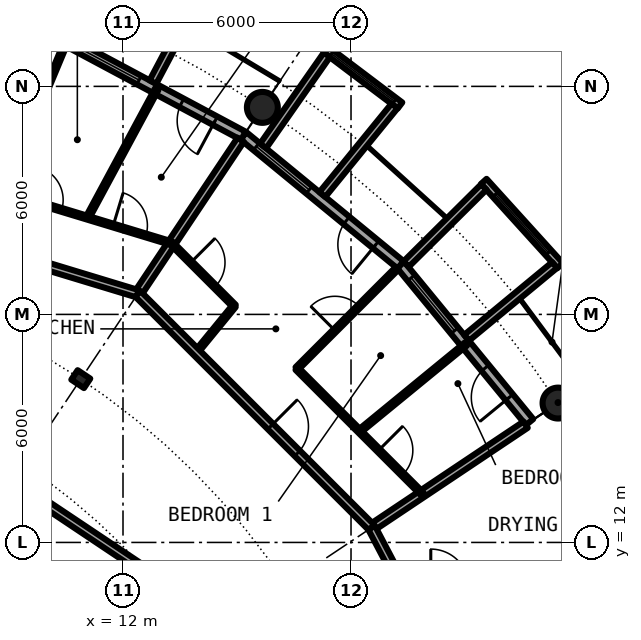
"""IFC4 building model, lengths in metres.
Left out: names, types, materials, properties, quantities, classifications, styles, units other than length and angle.
Written with IfcOpenShell. Run it as: python <this file> out.ifc"""

import sys

from ifc_helpers import new_model, si_unit, direction, frame, frame_2d, origin, origin_2d, place, context, subcontext, project, spatial, rectangle, circle, hollow_circle, i_section, extrude, element, fill, save


model = new_model("IFC4")
c1 = context("Model", 3, precision=1e-05, world=origin(), true_north=direction((0.0, 1.0)))
c2 = subcontext(c1, "Body", "Model", "MODEL_VIEW")
j1 = project(units=[si_unit("LENGTHUNIT", "METRE"), si_unit("PLANEANGLEUNIT", "RADIAN")], contexts=[c1])
p1 = place(None, origin())
s1 = spatial("IfcSite", under=j1, at=p1, CompositionType="ELEMENT")
p2 = place(p1, origin())
s2 = spatial("IfcBuilding", under=s1, at=p2, CompositionType="ELEMENT")
p3 = place(p2, frame((0.0, 0.0, 218.8)))
s3 = spatial("IfcBuildingStorey", under=s2, at=p3, CompositionType="ELEMENT", Elevation=218.8)
for number, where, z_axis, x_axis in (
    (1, (23.448, 15.667, 0.0), (0.0, 0.0, 1.0), (1.0, 0.0, 0.0)),
    (2, (15.667, 23.448, 0.0), (0.0, 0.0, 1.0), (1.0, 0.0, 0.0)),
):
    element("IfcColumn", number, at=place(p3, frame(where, z_axis=z_axis, x_axis=x_axis)), inside=s3, PredefinedType="COLUMN", context=c2, shape_type="SweptSolid", body=[
        extrude(hollow_circle(Radius=0.406, WallThickness=0.03, at=origin_2d()), origin(), (0.0, 0.0, 1.0), 3.05),
    ])
p4 = place(p3, frame((10.889, 16.297, 0.0), z_axis=(0.0, 0.0, 1.0), x_axis=(0.55557023302, 0.831469612303, 0.0)))
e3 = element("IfcColumn", 3, at=p4, inside=s3, PredefinedType="COLUMN", context=c2, shape_type="SweptSolid", body=[
    extrude(i_section(OverallWidth=0.3, OverallDepth=0.4, WebThickness=0.013, FlangeThickness=0.024, FilletRadius=0.027, at=origin_2d()), origin(), (0.0, 0.0, 1.0), 3.05),
])
p5 = place(p3, frame((22.699, 15.167, 0.0), z_axis=(0.0, 0.0, 1.0), x_axis=(-0.634382322723, 0.773019449054, 0.0)))
e4 = element("IfcWall", 4, at=p5, inside=s3, PredefinedType="SOLIDWALL", context=c2, shape_type="SweptSolid", body=[
    extrude(rectangle(XDim=5.352, YDim=0.25, at=frame_2d((2.676, 0.0))), origin(), (0.0, 0.0, 1.0), 2.65),
])
p6 = place(p5, frame((0.841, 0.0, 0.0)))
e5 = element("IfcOpeningElement", 5, at=p6, cuts=e4, PredefinedType="OPENING", context=c2, shape_type="SweptSolid", body=[
    extrude(rectangle(XDim=1.0, YDim=2.2, at=frame_2d((0.5, 1.1))), frame((0.0, 0.135, 0.0), z_axis=(0.0, -1.0, 0.0), x_axis=(1.0, 0.0, 0.0)), (0.0, 0.0, 1.0), 0.27),
])
p7 = place(p5, frame((3.111, 0.0, 0.3)))
e6 = element("IfcOpeningElement", 6, at=p7, cuts=e4, PredefinedType="OPENING", context=c2, shape_type="SweptSolid", body=[
    extrude(rectangle(XDim=1.8, YDim=2.1, at=frame_2d((0.9, 1.05))), frame((0.0, 0.135, 0.0), z_axis=(0.0, -1.0, 0.0), x_axis=(1.0, 0.0, 0.0)), (0.0, 0.0, 1.0), 0.27),
])
p8 = place(p3, frame((23.503, 19.282, -0.03), z_axis=(0.0, 0.0, 1.0), x_axis=(-0.671506829416, 0.740998365753, 0.0)))
e7 = element("IfcWall", 7, at=p8, inside=s3, PredefinedType="SOLIDWALL", context=c2, shape_type="SweptSolid", body=[
    extrude(rectangle(XDim=2.993, YDim=0.2, at=frame_2d((1.497, 0.0))), origin(), (0.0, 0.0, 1.0), 2.68),
])
p9 = place(p8, frame((0.457, 0.0, 0.33)))
e8 = element("IfcOpeningElement", 8, at=p9, cuts=e7, PredefinedType="OPENING", context=c2, shape_type="SweptSolid", body=[
    extrude(circle(Radius=1.04, at=frame_2d((1.04, 1.04))), frame((0.0, 0.11, 0.0), z_axis=(0.0, -1.0, 0.0), x_axis=(1.0, 0.0, 0.0)), (0.0, 0.0, 1.0), 0.22),
])
p10 = place(p3, frame((21.041, 17.384, -0.03), z_axis=(0.0, 0.0, 1.0), x_axis=(0.770784861449, 0.63709551667, 0.0)))
e9 = element("IfcWall", 9, at=p10, inside=s3, PredefinedType="SOLIDWALL", context=c2, shape_type="SweptSolid", body=[
    extrude(rectangle(XDim=3.006, YDim=0.2, at=frame_2d((1.503, 0.0))), origin(), (0.0, 0.0, 1.0), 2.68),
])
p11 = place(p3, frame((19.45, 19.323, -0.03), z_axis=(0.0, 0.0, 1.0), x_axis=(0.709727076896, 0.704476739375, 0.0)))
e10 = element("IfcWall", 10, at=p11, inside=s3, PredefinedType="SOLIDWALL", context=c2, shape_type="SweptSolid", body=[
    extrude(rectangle(XDim=2.883, YDim=0.2, at=frame_2d((1.441, 0.0))), origin(), (0.0, 0.0, 1.0), 2.68),
])
p12 = place(p3, frame((19.304, 19.304, 0.0), z_axis=(0.0, 0.0, 1.0), x_axis=(-0.773019449054, 0.634382322723, 0.0)))
e11 = element("IfcWall", 11, at=p12, inside=s3, PredefinedType="SOLIDWALL", context=c2, shape_type="SweptSolid", body=[
    extrude(rectangle(XDim=5.352, YDim=0.25, at=frame_2d((2.676, 0.0))), origin(), (0.0, 0.0, 1.0), 2.65),
])
p13 = place(p12, frame((0.841, 0.0, 0.0)))
e12 = element("IfcOpeningElement", 12, at=p13, cuts=e11, PredefinedType="OPENING", context=c2, shape_type="SweptSolid", body=[
    extrude(rectangle(XDim=1.0, YDim=2.2, at=frame_2d((0.5, 1.1))), frame((0.0, 0.135, 0.0), z_axis=(0.0, -1.0, 0.0), x_axis=(1.0, 0.0, 0.0)), (0.0, 0.0, 1.0), 0.27),
])
p14 = place(p12, frame((3.111, 0.0, 0.3)))
e13 = element("IfcOpeningElement", 13, at=p14, cuts=e11, PredefinedType="OPENING", context=c2, shape_type="SweptSolid", body=[
    extrude(rectangle(XDim=1.8, YDim=2.1, at=frame_2d((0.9, 1.05))), frame((0.0, 0.135, 0.0), z_axis=(0.0, -1.0, 0.0), x_axis=(1.0, 0.0, 0.0)), (0.0, 0.0, 1.0), 0.27),
])
p15 = place(p3, frame((19.289, 23.497, -0.03), z_axis=(0.0, 0.0, 1.0), x_axis=(-0.797887588059, 0.602806268067, 0.0)))
e14 = element("IfcWall", 14, at=p15, inside=s3, PredefinedType="SOLIDWALL", context=c2, shape_type="SweptSolid", body=[
    extrude(rectangle(XDim=2.447, YDim=0.2, at=frame_2d((1.223, 0.0))), origin(), (0.0, 0.0, 1.0), 2.68),
])
p16 = place(p15, frame((0.183, 0.0, 0.33)))
e15 = element("IfcOpeningElement", 15, at=p16, cuts=e14, PredefinedType="OPENING", context=c2, shape_type="SweptSolid", body=[
    extrude(circle(Radius=1.04, at=frame_2d((1.04, 1.04))), frame((0.0, 0.11, 0.0), z_axis=(0.0, -1.0, 0.0), x_axis=(1.0, 0.0, 0.0)), (0.0, 0.0, 1.0), 0.22),
])
p17 = place(p3, frame((17.246, 21.155, -0.03), z_axis=(0.0, 0.0, 1.0), x_axis=(0.631741648902, 0.775179004516, 0.0)))
e16 = element("IfcWall", 16, at=p17, inside=s3, PredefinedType="SOLIDWALL", context=c2, shape_type="SweptSolid", body=[
    extrude(rectangle(XDim=3.006, YDim=0.2, at=frame_2d((1.503, 0.0))), origin(), (0.0, 0.0, 1.0), 2.68),
])
p18 = place(p3, frame((15.688, 22.433, -0.03), z_axis=(0.0, 0.0, 1.0), x_axis=(0.573260687834, 0.819373043115, 0.0)))
e17 = element("IfcWall", 17, at=p18, inside=s3, PredefinedType="SOLIDWALL", context=c2, shape_type="SweptSolid", body=[
    extrude(rectangle(XDim=2.925, YDim=0.2, at=frame_2d((1.463, 0.0))), origin(), (0.0, 0.0, 1.0), 2.68),
])
p19 = place(p3, frame((15.167, 22.699, 0.0), z_axis=(0.0, 0.0, 1.0), x_axis=(-0.881915646801, 0.471407246368, 0.0)))
e18 = element("IfcWall", 18, at=p19, inside=s3, PredefinedType="SOLIDWALL", context=c2, shape_type="SweptSolid", body=[
    extrude(rectangle(XDim=5.352, YDim=0.25, at=frame_2d((2.676, 0.0))), origin(), (0.0, 0.0, 1.0), 2.65),
])
p20 = place(p19, frame((0.841, 0.0, 0.0)))
e19 = element("IfcOpeningElement", 19, at=p20, cuts=e18, PredefinedType="OPENING", context=c2, shape_type="SweptSolid", body=[
    extrude(rectangle(XDim=1.0, YDim=2.2, at=frame_2d((0.5, 1.1))), frame((0.0, 0.135, 0.0), z_axis=(0.0, -1.0, 0.0), x_axis=(1.0, 0.0, 0.0)), (0.0, 0.0, 1.0), 0.27),
])
p21 = place(p19, frame((3.111, 0.0, 0.3)))
e20 = element("IfcOpeningElement", 20, at=p21, cuts=e18, PredefinedType="OPENING", context=c2, shape_type="SweptSolid", body=[
    extrude(rectangle(XDim=1.8, YDim=2.1, at=frame_2d((0.9, 1.05))), frame((0.0, 0.135, 0.0), z_axis=(0.0, -1.0, 0.0), x_axis=(1.0, 0.0, 0.0)), (0.0, 0.0, 1.0), 0.27),
])
p22 = place(p3, frame((12.787, 24.113, -0.03), z_axis=(0.0, 0.0, 1.0), x_axis=(0.468365282436, 0.883534924159, 0.0)))
e21 = element("IfcWall", 21, at=p22, inside=s3, PredefinedType="SOLIDWALL", context=c2, shape_type="SweptSolid", body=[
    extrude(rectangle(XDim=3.006, YDim=0.2, at=frame_2d((1.503, 0.0))), origin(), (0.0, 0.0, 1.0), 2.68),
])
p23 = place(p3, frame((8.852, 21.215, 0.0), z_axis=(0.0, 0.0, 1.0), x_axis=(0.385232176411, 0.922819684585, 0.0)))
e22 = element("IfcWall", 22, at=p23, inside=s3, PredefinedType="PARTITIONING", context=c2, shape_type="SweptSolid", body=[
    extrude(rectangle(XDim=4.187, YDim=0.1, at=frame_2d((2.094, 0.0))), origin(), (0.0, 0.0, 1.0), 2.65),
])
p24 = place(p3, frame((11.065, 20.543, 0.0), z_axis=(0.0, 0.0, 1.0), x_axis=(0.474281720599, 0.88037313084, 0.0)))
e23 = element("IfcWall", 23, at=p24, inside=s3, PredefinedType="PARTITIONING", context=c2, shape_type="SweptSolid", body=[
    extrude(rectangle(XDim=3.842, YDim=0.1, at=frame_2d((1.921, 0.0))), origin(), (0.0, 0.0, 1.0), 2.65),
])
p25 = place(p3, frame((12.389, 18.542, 0.0), z_axis=(0.0, 0.0, 1.0), x_axis=(0.555462686211, 0.831541462723, 0.0)))
e24 = element("IfcWall", 24, at=p25, inside=s3, PredefinedType="PARTITIONING", context=c2, shape_type="SweptSolid", body=[
    extrude(rectangle(XDim=4.875, YDim=0.2, at=frame_2d((2.438, 0.0))), origin(), (0.0, 0.0, 1.0), 2.65),
])
p26 = place(p3, frame((16.575, 16.575, 0.0), z_axis=(0.0, 0.0, 1.0), x_axis=(0.707106781187, 0.707106781187, 0.0)))
e25 = element("IfcWall", 25, at=p26, inside=s3, PredefinedType="PARTITIONING", context=c2, shape_type="SweptSolid", body=[
    extrude(rectangle(XDim=3.735, YDim=0.1, at=frame_2d((1.868, 0.0))), origin(), (0.0, 0.0, 1.0), 2.65),
])
p27 = place(p26, frame((1.417, 0.0, 0.0)))
e26 = element("IfcOpeningElement", 26, at=p27, cuts=e25, PredefinedType="OPENING", context=c2, shape_type="SweptSolid", body=[
    extrude(rectangle(XDim=0.9, YDim=2.3, at=frame_2d((0.45, 1.15))), frame((0.0, 0.06, 0.0), z_axis=(0.0, -1.0, 0.0), x_axis=(1.0, 0.0, 0.0)), (0.0, 0.0, 1.0), 0.12),
])
p28 = place(p3, frame((18.224, 14.927, 0.0), z_axis=(0.0, 0.0, 1.0), x_axis=(0.773548271597, 0.633737383709, 0.0)))
e27 = element("IfcWall", 27, at=p28, inside=s3, PredefinedType="PARTITIONING", context=c2, shape_type="SweptSolid", body=[
    extrude(rectangle(XDim=3.618, YDim=0.1, at=frame_2d((1.809, 0.0))), origin(), (0.0, 0.0, 1.0), 2.65),
])
p29 = place(p3, frame((18.542, 12.389, 0.0), z_axis=(0.0, 0.0, 1.0), x_axis=(0.831387096605, 0.55569370664, 0.0)))
e28 = element("IfcWall", 28, at=p29, inside=s3, PredefinedType="PARTITIONING", context=c2, shape_type="SweptSolid", body=[
    extrude(rectangle(XDim=4.875, YDim=0.2, at=frame_2d((2.438, 0.0))), origin(), (0.0, 0.0, 1.0), 2.65),
])
p30 = place(p3, frame((13.927, 17.004, 0.0), z_axis=(0.0, 0.0, 1.0), x_axis=(0.633861186344, 0.773446828454, 0.0)))
e29 = element("IfcWall", 29, at=p30, inside=s3, PredefinedType="PARTITIONING", context=c2, shape_type="SweptSolid", body=[
    extrude(rectangle(XDim=1.578, YDim=0.1, at=frame_2d((0.789, 0.0))), origin(), (0.0, 0.0, 1.0), 2.65),
])
p31 = place(p3, frame((3.453, 17.36, 0.0), z_axis=(0.0, 0.0, 1.0), x_axis=(0.831437137577, -0.555618831806, 0.0)))
e30 = element("IfcWall", 30, at=p31, inside=s3, PredefinedType="PARTITIONING", context=c2, shape_type="SweptSolid", body=[
    extrude(rectangle(XDim=13.549, YDim=0.2, at=frame_2d((6.774, 0.0))), origin(), (0.0, 0.0, 1.0), 2.65),
])
p32 = place(p31, frame((4.581, 0.0, 0.0)))
e31 = element("IfcOpeningElement", 31, at=p32, cuts=e30, PredefinedType="OPENING", context=c2, shape_type="SweptSolid", body=[
    extrude(rectangle(XDim=1.0, YDim=2.3, at=frame_2d((0.5, 1.15))), frame((0.0, 0.11, 0.0), z_axis=(0.0, -1.0, 0.0), x_axis=(1.0, 0.0, 0.0)), (0.0, 0.0, 1.0), 0.22),
])
p33 = place(p3, frame((0.0, 22.3, 0.0), z_axis=(0.0, 0.0, 1.0), x_axis=(0.956942051091, -0.290279022415, 0.0)))
e32 = element("IfcWall", 32, at=p33, inside=s3, PredefinedType="PARTITIONING", context=c2, shape_type="SweptSolid", body=[
    extrude(rectangle(XDim=12.946, YDim=0.2, at=frame_2d((6.473, 0.0))), origin(), (0.0, 0.0, 1.0), 2.65),
])
p34 = place(p33, frame((7.052, 0.0, 0.0)))
e33 = element("IfcOpeningElement", 33, at=p34, cuts=e32, PredefinedType="OPENING", context=c2, shape_type="SweptSolid", body=[
    extrude(rectangle(XDim=1.0, YDim=2.3, at=frame_2d((0.5, 1.15))), frame((0.0, 0.11, 0.0), z_axis=(0.0, -1.0, 0.0), x_axis=(1.0, 0.0, 0.0)), (0.0, 0.0, 1.0), 0.22),
])
p35 = place(p3, frame((12.389, 18.542, 0.0), z_axis=(0.0, 0.0, 1.0), x_axis=(0.707106781187, -0.707106781187, 0.0)))
e34 = element("IfcWall", 34, at=p35, inside=s3, PredefinedType="PARTITIONING", context=c2, shape_type="SweptSolid", body=[
    extrude(rectangle(XDim=8.702, YDim=0.2, at=frame_2d((4.351, 0.0))), origin(), (0.0, 0.0, 1.0), 2.65),
])
p36 = place(p35, frame((4.938, 0.0, 0.0)))
e35 = element("IfcOpeningElement", 35, at=p36, cuts=e34, PredefinedType="OPENING", context=c2, shape_type="SweptSolid", body=[
    extrude(rectangle(XDim=1.0, YDim=2.3, at=frame_2d((0.5, 1.15))), frame((0.0, 0.11, 0.0), z_axis=(0.0, -1.0, 0.0), x_axis=(1.0, 0.0, 0.0)), (0.0, 0.0, 1.0), 0.22),
])
p37 = place(p3, frame((18.542, 12.389, 0.0), z_axis=(0.0, 0.0, 1.0), x_axis=(0.465359652486, -0.885121683068, 0.0)))
e36 = element("IfcWall", 36, at=p37, inside=s3, PredefinedType="PARTITIONING", context=c2, shape_type="SweptSolid", body=[
    extrude(rectangle(XDim=1.665, YDim=0.2, at=frame_2d((0.833, 0.0))), origin(), (0.0, 0.0, 1.0), 2.65),
])
p38 = place(p3, frame((6.639, 21.886, 0.0), z_axis=(0.0, 0.0, 1.0), x_axis=(0.956938868877, -0.290289512785, 0.0)))
e37 = element("IfcWall", 37, at=p38, inside=s3, PredefinedType="PARTITIONING", context=c2, shape_type="SweptSolid", body=[
    extrude(rectangle(XDim=6.941, YDim=0.1, at=frame_2d((3.47, 0.0))), origin(), (0.0, 0.0, 1.0), 2.65),
])
p39 = place(p38, frame((3.016, 0.0, 0.0)))
e38 = element("IfcOpeningElement", 38, at=p39, cuts=e37, PredefinedType="OPENING", context=c2, shape_type="SweptSolid", body=[
    extrude(rectangle(XDim=0.9, YDim=2.3, at=frame_2d((0.45, 1.15))), frame((0.0, 0.06, 0.0), z_axis=(0.0, -1.0, 0.0), x_axis=(1.0, 0.0, 0.0)), (0.0, 0.0, 1.0), 0.12),
])
p40 = place(p38, frame((5.333, 0.0, 0.0)))
e39 = element("IfcOpeningElement", 39, at=p40, cuts=e37, PredefinedType="OPENING", context=c2, shape_type="SweptSolid", body=[
    extrude(rectangle(XDim=0.9, YDim=2.3, at=frame_2d((0.45, 1.15))), frame((0.0, 0.06, 0.0), z_axis=(0.0, -1.0, 0.0), x_axis=(1.0, 0.0, 0.0)), (0.0, 0.0, 1.0), 0.12),
])
p41 = place(p3, frame((13.283, 19.867, 0.0), z_axis=(0.0, 0.0, 1.0), x_axis=(0.707106781187, -0.707106781187, 0.0)))
e40 = element("IfcWall", 40, at=p41, inside=s3, PredefinedType="PARTITIONING", context=c2, shape_type="SweptSolid", body=[
    extrude(rectangle(XDim=2.332, YDim=0.1, at=frame_2d((1.166, 0.0))), origin(), (0.0, 0.0, 1.0), 2.65),
])
p42 = place(p41, frame((0.709, 0.0, 0.0)))
e41 = element("IfcOpeningElement", 41, at=p42, cuts=e40, PredefinedType="OPENING", context=c2, shape_type="SweptSolid", body=[
    extrude(rectangle(XDim=0.9, YDim=2.3, at=frame_2d((0.45, 1.15))), frame((0.0, 0.06, 0.0), z_axis=(0.0, -1.0, 0.0), x_axis=(1.0, 0.0, 0.0)), (0.0, 0.0, 1.0), 0.12),
])
p43 = place(p3, frame((16.575, 16.575, 0.0), z_axis=(0.0, 0.0, 1.0), x_axis=(0.707132961115, -0.707080600289, 0.0)))
e42 = element("IfcWall", 42, at=p43, inside=s3, PredefinedType="PARTITIONING", context=c2, shape_type="SweptSolid", body=[
    extrude(rectangle(XDim=4.663, YDim=0.1, at=frame_2d((2.331, 0.0))), origin(), (0.0, 0.0, 1.0), 2.65),
])
p44 = place(p43, frame((3.043, 0.0, 0.0)))
e43 = element("IfcOpeningElement", 43, at=p44, cuts=e42, PredefinedType="OPENING", context=c2, shape_type="SweptSolid", body=[
    extrude(rectangle(XDim=0.9, YDim=2.3, at=frame_2d((0.45, 1.15))), frame((0.0, 0.06, 0.0), z_axis=(0.0, -1.0, 0.0), x_axis=(1.0, 0.0, 0.0)), (0.0, 0.0, 1.0), 0.12),
])
p45 = place(p6, origin())
e44 = element("IfcDoor", 44, at=p45, inside=s3, OperationType="SINGLE_SWING_LEFT", PredefinedType="DOOR", context=c2, shape_type="SweptSolid", body=[
    extrude(rectangle(XDim=1.0, YDim=2.2, at=frame_2d((0.5, 1.1))), frame((0.0, 0.025, 0.0), z_axis=(0.0, -1.0, 0.0), x_axis=(1.0, 0.0, 0.0)), (0.0, 0.0, 1.0), 0.05),
])
fill(e5, e44)
p46 = place(p7, origin())
e45 = element("IfcWindow", 45, at=p46, inside=s3, PartitioningType="SINGLE_PANEL", PredefinedType="WINDOW", context=c2, shape_type="SweptSolid", body=[
    extrude(rectangle(XDim=1.8, YDim=2.1, at=frame_2d((0.9, 1.05))), frame((0.0, 0.03, 0.0), z_axis=(0.0, -1.0, 0.0), x_axis=(1.0, 0.0, 0.0)), (0.0, 0.0, 1.0), 0.06),
])
fill(e6, e45)
p47 = place(p9, origin())
e46 = element("IfcWindow", 46, at=p47, inside=s3, PartitioningType="SINGLE_PANEL", PredefinedType="WINDOW", context=c2, shape_type="SweptSolid", body=[
    extrude(circle(Radius=1.04, at=frame_2d((1.04, 1.04))), frame((0.0, 0.03, 0.0), z_axis=(0.0, -1.0, 0.0), x_axis=(1.0, 0.0, 0.0)), (0.0, 0.0, 1.0), 0.06),
])
fill(e8, e46)
p48 = place(p13, origin())
e47 = element("IfcDoor", 47, at=p48, inside=s3, OperationType="SINGLE_SWING_LEFT", PredefinedType="DOOR", context=c2, shape_type="SweptSolid", body=[
    extrude(rectangle(XDim=1.0, YDim=2.2, at=frame_2d((0.5, 1.1))), frame((0.0, 0.025, 0.0), z_axis=(0.0, -1.0, 0.0), x_axis=(1.0, 0.0, 0.0)), (0.0, 0.0, 1.0), 0.05),
])
fill(e12, e47)
p49 = place(p14, origin())
e48 = element("IfcWindow", 48, at=p49, inside=s3, PartitioningType="SINGLE_PANEL", PredefinedType="WINDOW", context=c2, shape_type="SweptSolid", body=[
    extrude(rectangle(XDim=1.8, YDim=2.1, at=frame_2d((0.9, 1.05))), frame((0.0, 0.03, 0.0), z_axis=(0.0, -1.0, 0.0), x_axis=(1.0, 0.0, 0.0)), (0.0, 0.0, 1.0), 0.06),
])
fill(e13, e48)
p50 = place(p16, origin())
e49 = element("IfcWindow", 49, at=p50, inside=s3, PartitioningType="SINGLE_PANEL", PredefinedType="WINDOW", context=c2, shape_type="SweptSolid", body=[
    extrude(circle(Radius=1.04, at=frame_2d((1.04, 1.04))), frame((0.0, 0.03, 0.0), z_axis=(0.0, -1.0, 0.0), x_axis=(1.0, 0.0, 0.0)), (0.0, 0.0, 1.0), 0.06),
])
fill(e15, e49)
p51 = place(p20, origin())
e50 = element("IfcDoor", 50, at=p51, inside=s3, OperationType="SINGLE_SWING_LEFT", PredefinedType="DOOR", context=c2, shape_type="SweptSolid", body=[
    extrude(rectangle(XDim=1.0, YDim=2.2, at=frame_2d((0.5, 1.1))), frame((0.0, 0.025, 0.0), z_axis=(0.0, -1.0, 0.0), x_axis=(1.0, 0.0, 0.0)), (0.0, 0.0, 1.0), 0.05),
])
fill(e19, e50)
p52 = place(p21, origin())
e51 = element("IfcWindow", 51, at=p52, inside=s3, PartitioningType="SINGLE_PANEL", PredefinedType="WINDOW", context=c2, shape_type="SweptSolid", body=[
    extrude(rectangle(XDim=1.8, YDim=2.1, at=frame_2d((0.9, 1.05))), frame((0.0, 0.03, 0.0), z_axis=(0.0, -1.0, 0.0), x_axis=(1.0, 0.0, 0.0)), (0.0, 0.0, 1.0), 0.06),
])
fill(e20, e51)
p53 = place(p36, origin())
e52 = element("IfcDoor", 52, at=p53, inside=s3, OperationType="SINGLE_SWING_RIGHT", PredefinedType="DOOR", context=c2, shape_type="SweptSolid", body=[
    extrude(rectangle(XDim=1.0, YDim=2.3, at=frame_2d((0.5, 1.15))), frame((0.0, 0.025, 0.0), z_axis=(0.0, -1.0, 0.0), x_axis=(1.0, 0.0, 0.0)), (0.0, 0.0, 1.0), 0.05),
])
fill(e35, e52)
p54 = place(p42, origin())
e53 = element("IfcDoor", 53, at=p54, inside=s3, OperationType="SINGLE_SWING_LEFT", PredefinedType="DOOR", context=c2, shape_type="SweptSolid", body=[
    extrude(rectangle(XDim=0.9, YDim=2.3, at=frame_2d((0.45, 1.15))), frame((0.0, 0.025, 0.0), z_axis=(0.0, -1.0, 0.0), x_axis=(1.0, 0.0, 0.0)), (0.0, 0.0, 1.0), 0.05),
])
fill(e41, e53)
p55 = place(p27, origin())
e54 = element("IfcDoor", 54, at=p55, inside=s3, OperationType="SINGLE_SWING_RIGHT", PredefinedType="DOOR", context=c2, shape_type="SweptSolid", body=[
    extrude(rectangle(XDim=0.9, YDim=2.3, at=frame_2d((0.45, 1.15))), frame((0.0, 0.025, 0.0), z_axis=(0.0, -1.0, 0.0), x_axis=(1.0, 0.0, 0.0)), (0.0, 0.0, 1.0), 0.05),
])
fill(e26, e54)
p56 = place(p44, origin())
e55 = element("IfcDoor", 55, at=p56, inside=s3, OperationType="SINGLE_SWING_RIGHT", PredefinedType="DOOR", context=c2, shape_type="SweptSolid", body=[
    extrude(rectangle(XDim=0.9, YDim=2.3, at=frame_2d((0.45, 1.15))), frame((0.0, 0.025, 0.0), z_axis=(0.0, -1.0, 0.0), x_axis=(1.0, 0.0, 0.0)), (0.0, 0.0, 1.0), 0.05),
])
fill(e43, e55)
p57 = place(p39, origin())
e56 = element("IfcDoor", 56, at=p57, inside=s3, OperationType="SINGLE_SWING_LEFT", PredefinedType="DOOR", context=c2, shape_type="SweptSolid", body=[
    extrude(rectangle(XDim=0.9, YDim=2.3, at=frame_2d((0.45, 1.15))), frame((0.0, 0.025, 0.0), z_axis=(0.0, -1.0, 0.0), x_axis=(1.0, 0.0, 0.0)), (0.0, 0.0, 1.0), 0.05),
])
fill(e38, e56)
p58 = place(p40, origin())
e57 = element("IfcDoor", 57, at=p58, inside=s3, OperationType="SINGLE_SWING_RIGHT", PredefinedType="DOOR", context=c2, shape_type="SweptSolid", body=[
    extrude(rectangle(XDim=0.9, YDim=2.3, at=frame_2d((0.45, 1.15))), frame((0.0, 0.025, 0.0), z_axis=(0.0, -1.0, 0.0), x_axis=(1.0, 0.0, 0.0)), (0.0, 0.0, 1.0), 0.05),
])
fill(e39, e57)
save(model, sys.argv[1])
